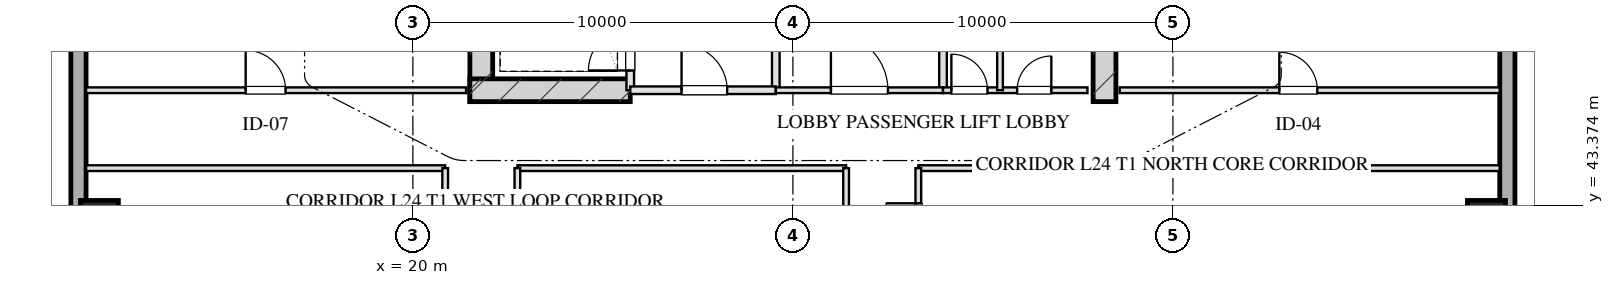
"""IFC4 building model, lengths in metres.
Left out: names, types, materials, properties, quantities, classifications, styles, units other than length and angle.
Written with IfcOpenShell. Run it as: python <this file> out.ifc"""

import sys

from ifc_helpers import new_model, si_unit, direction, frame, frame_2d, origin, origin_2d, place, context, subcontext, project, spatial, rectangle, hollow_rectangle, extrude, element, fill, save


model = new_model("IFC4")
c1 = context("Model", 3, precision=1e-05, world=origin(), true_north=direction((0.0, 1.0)))
c2 = subcontext(c1, "Body", "Model", "MODEL_VIEW")
j1 = project(units=[si_unit("LENGTHUNIT", "METRE"), si_unit("PLANEANGLEUNIT", "RADIAN")], contexts=[c1])
p1 = place(None, origin())
s1 = spatial("IfcSite", under=j1, at=p1, CompositionType="ELEMENT")
p2 = place(p1, origin())
s2 = spatial("IfcBuilding", under=s1, at=p2, CompositionType="ELEMENT")
p3 = place(p2, frame((0.0, 0.0, 96.6)))
s3 = spatial("IfcBuildingStorey", under=s2, at=p3, CompositionType="ELEMENT", Elevation=96.6)
for number, where, z_axis, x_axis in (
    (1, (21.8, 46.1, 0.0), (0.0, 0.0, 1.0), (0.0, 1.0, 0.0)),
    (2, (38.2, 46.1, 0.0), (0.0, 0.0, 1.0), (0.0, 1.0, 0.0)),
):
    element("IfcWall", number, at=place(p3, frame(where, z_axis=z_axis, x_axis=x_axis)), inside=s3, PredefinedType="SHEAR", context=c2, shape_type="SweptSolid", body=[
        extrude(rectangle(XDim=9.48, YDim=0.6, at=frame_2d((4.74, 0.0))), origin(), (0.0, 0.0, 1.0), 3.45),
    ])
p4 = place(p3, frame((21.5, 46.4, 0.0), z_axis=(0.0, 0.0, 1.0), x_axis=(1.0, 0.0, 0.0)))
e3 = element("IfcWall", 3, at=p4, inside=s3, PredefinedType="SHEAR", context=c2, shape_type="SweptSolid", body=[
    extrude(rectangle(XDim=4.22, YDim=0.6, at=frame_2d((2.11, 0.0))), origin(), (0.0, 0.0, 1.0), 3.45),
])
for number, where, z_axis, x_axis in (
    (4, (11.75, 43.0, 0.0), (0.0, 0.0, 1.0), (1.0, 0.0, 0.0)),
    (5, (48.25, 43.0, 0.0), (0.0, 0.0, 1.0), (1.0, 0.0, 0.0)),
):
    element("IfcColumn", number, at=place(p3, frame(where, z_axis=z_axis, x_axis=x_axis)), inside=s3, PredefinedType="COLUMN", context=c2, shape_type="SweptSolid", body=[
        extrude(hollow_rectangle(XDim=1.0, YDim=1.0, WallThickness=0.036, at=origin_2d()), origin(), (0.0, 0.0, 1.0), 3.451),
    ])
p5 = place(p3, frame((11.2, 9.0, 0.0), z_axis=(0.0, 0.0, 1.0), x_axis=(0.0, 1.0, 0.0)))
e6 = element("IfcWall", 6, at=p5, inside=s3, PredefinedType="SOLIDWALL", context=c2, shape_type="SweptSolid", body=[
    extrude(rectangle(XDim=50.0, YDim=0.4, at=frame_2d((25.0, 0.0))), origin(), (0.0, 0.0, 1.0), 2.55),
])
p6 = place(p5, frame((21.2, 0.0, 0.75)))
e7 = element("IfcOpeningElement", 7, at=p6, cuts=e6, PredefinedType="OPENING", context=c2, shape_type="SweptSolid", body=[
    extrude(rectangle(XDim=2.4, YDim=1.4, at=frame_2d((1.2, 0.7))), frame((0.0, 0.21, 0.0), z_axis=(0.0, -1.0, 0.0), x_axis=(1.0, 0.0, 0.0)), (0.0, 0.0, 1.0), 0.42),
])
p7 = place(p5, frame((26.4, 0.0, 0.75)))
e8 = element("IfcOpeningElement", 8, at=p7, cuts=e6, PredefinedType="OPENING", context=c2, shape_type="SweptSolid", body=[
    extrude(rectangle(XDim=2.4, YDim=1.4, at=frame_2d((1.2, 0.7))), frame((0.0, 0.21, 0.0), z_axis=(0.0, -1.0, 0.0), x_axis=(1.0, 0.0, 0.0)), (0.0, 0.0, 1.0), 0.42),
])
p8 = place(p3, frame((48.8, 59.0, 0.0), z_axis=(0.0, 0.0, 1.0), x_axis=(0.0, -1.0, 0.0)))
e9 = element("IfcWall", 9, at=p8, inside=s3, PredefinedType="SOLIDWALL", context=c2, shape_type="SweptSolid", body=[
    extrude(rectangle(XDim=50.0, YDim=0.4, at=frame_2d((25.0, 0.0))), origin(), (0.0, 0.0, 1.0), 2.55),
])
p9 = place(p3, frame((25.72, 46.4, 0.0), z_axis=(0.0, 0.0, 1.0), x_axis=(0.0, 1.0, 0.0)))
e10 = element("IfcWall", 10, at=p9, inside=s3, PredefinedType="PARTITIONING", context=c2, shape_type="SweptSolid", body=[
    extrude(rectangle(XDim=1.9, YDim=0.2, at=frame_2d((0.95, 0.0))), origin(), (0.0, 0.0, 1.0), 3.155),
])
p10 = place(p9, frame((0.52, 0.0, 0.0)))
e11 = element("IfcOpeningElement", 11, at=p10, cuts=e10, PredefinedType="OPENING", context=c2, shape_type="SweptSolid", body=[
    extrude(rectangle(XDim=1.1, YDim=2.05, at=frame_2d((0.55, 1.025))), frame((0.0, 0.11, 0.0), z_axis=(0.0, -1.0, 0.0), x_axis=(1.0, 0.0, 0.0)), (0.0, 0.0, 1.0), 0.22),
])
p11 = place(p3, frame((29.55, 46.4, 0.0), z_axis=(0.0, 0.0, 1.0), x_axis=(0.0, 1.0, 0.0)))
e12 = element("IfcWall", 12, at=p11, inside=s3, PredefinedType="PARTITIONING", context=c2, shape_type="SweptSolid", body=[
    extrude(rectangle(XDim=8.43, YDim=0.2, at=frame_2d((4.215, 0.0))), origin(), (0.0, 0.0, 1.0), 3.155),
])
p12 = place(p3, frame((25.72, 46.4, 0.0), z_axis=(0.0, 0.0, 1.0), x_axis=(1.0, 0.0, 0.0)))
e13 = element("IfcWall", 13, at=p12, inside=s3, PredefinedType="PARTITIONING", context=c2, shape_type="SweptSolid", body=[
    extrude(rectangle(XDim=3.83, YDim=0.2, at=frame_2d((1.915, 0.0))), origin(), (0.0, 0.0, 1.0), 3.155),
])
p13 = place(p12, frame((1.35, 0.0, 0.0)))
e14 = element("IfcOpeningElement", 14, at=p13, cuts=e13, PredefinedType="OPENING", context=c2, shape_type="SweptSolid", body=[
    extrude(rectangle(XDim=1.2, YDim=2.05, at=frame_2d((0.6, 1.025))), frame((0.0, 0.11, 0.0), z_axis=(0.0, -1.0, 0.0), x_axis=(1.0, 0.0, 0.0)), (0.0, 0.0, 1.0), 0.22),
])
p14 = place(p3, frame((33.95, 46.4, 0.0), z_axis=(0.0, 0.0, 1.0), x_axis=(0.0, 1.0, 0.0)))
e15 = element("IfcWall", 15, at=p14, inside=s3, PredefinedType="PARTITIONING", context=c2, shape_type="SweptSolid", body=[
    extrude(rectangle(XDim=8.43, YDim=0.2, at=frame_2d((4.215, 0.0))), origin(), (0.0, 0.0, 1.0), 3.155),
])
p15 = place(p3, frame((29.55, 46.4, 0.0), z_axis=(0.0, 0.0, 1.0), x_axis=(1.0, 0.0, 0.0)))
e16 = element("IfcWall", 16, at=p15, inside=s3, PredefinedType="PARTITIONING", context=c2, shape_type="SweptSolid", body=[
    extrude(rectangle(XDim=4.4, YDim=0.15, at=frame_2d((2.2, 0.0))), origin(), (0.0, 0.0, 1.0), 3.155),
])
p16 = place(p15, frame((1.45, 0.0, 0.0)))
e17 = element("IfcOpeningElement", 17, at=p16, cuts=e16, PredefinedType="OPENING", context=c2, shape_type="SweptSolid", body=[
    extrude(rectangle(XDim=1.5, YDim=2.05, at=frame_2d((0.75, 1.025))), frame((0.0, 0.085, 0.0), z_axis=(0.0, -1.0, 0.0), x_axis=(1.0, 0.0, 0.0)), (0.0, 0.0, 1.0), 0.17),
])
p17 = place(p3, frame((33.95, 46.4, 0.0), z_axis=(0.0, 0.0, 1.0), x_axis=(1.0, 0.0, 0.0)))
e18 = element("IfcWall", 18, at=p17, inside=s3, PredefinedType="PARTITIONING", context=c2, shape_type="SweptSolid", body=[
    extrude(rectangle(XDim=3.8, YDim=0.15, at=frame_2d((1.9, 0.0))), origin(), (0.0, 0.0, 1.0), 3.155),
])
p18 = place(p17, frame((0.22, 0.0, 0.0)))
e19 = element("IfcOpeningElement", 19, at=p18, cuts=e18, PredefinedType="OPENING", context=c2, shape_type="SweptSolid", body=[
    extrude(rectangle(XDim=0.95, YDim=2.05, at=frame_2d((0.475, 1.025))), frame((0.0, 0.085, 0.0), z_axis=(0.0, -1.0, 0.0), x_axis=(1.0, 0.0, 0.0)), (0.0, 0.0, 1.0), 0.17),
])
p19 = place(p17, frame((1.95, 0.0, 0.0)))
e20 = element("IfcOpeningElement", 20, at=p19, cuts=e18, PredefinedType="OPENING", context=c2, shape_type="SweptSolid", body=[
    extrude(rectangle(XDim=0.9, YDim=2.05, at=frame_2d((0.45, 1.025))), frame((0.0, 0.085, 0.0), z_axis=(0.0, -1.0, 0.0), x_axis=(1.0, 0.0, 0.0)), (0.0, 0.0, 1.0), 0.17),
])
p20 = place(p3, frame((35.45, 46.4, 0.0), z_axis=(0.0, 0.0, 1.0), x_axis=(0.0, 1.0, 0.0)))
e21 = element("IfcWall", 21, at=p20, inside=s3, PredefinedType="PARTITIONING", context=c2, shape_type="SweptSolid", body=[
    extrude(rectangle(XDim=8.43, YDim=0.15, at=frame_2d((4.215, 0.0))), origin(), (0.0, 0.0, 1.0), 2.765),
])
p21 = place(p20, frame((2.55, 0.0, 0.0)))
e22 = element("IfcOpeningElement", 22, at=p21, cuts=e21, PredefinedType="OPENING", context=c2, shape_type="SweptSolid", body=[
    extrude(rectangle(XDim=0.95, YDim=2.05, at=frame_2d((0.475, 1.025))), frame((0.0, 0.085, 0.0), z_axis=(0.0, -1.0, 0.0), x_axis=(1.0, 0.0, 0.0)), (0.0, 0.0, 1.0), 0.17),
])
p22 = place(p20, frame((5.6, 0.0, 0.0)))
e23 = element("IfcOpeningElement", 23, at=p22, cuts=e21, PredefinedType="OPENING", context=c2, shape_type="SweptSolid", body=[
    extrude(rectangle(XDim=0.9, YDim=2.05, at=frame_2d((0.45, 1.025))), frame((0.0, 0.085, 0.0), z_axis=(0.0, -1.0, 0.0), x_axis=(1.0, 0.0, 0.0)), (0.0, 0.0, 1.0), 0.17),
])
p23 = place(p3, frame((11.4, 46.4, 0.0), z_axis=(0.0, 0.0, 1.0), x_axis=(1.0, 0.0, 0.0)))
e24 = element("IfcWall", 24, at=p23, inside=s3, PredefinedType="PARTITIONING", context=c2, shape_type="SweptSolid", body=[
    extrude(rectangle(XDim=10.0, YDim=0.15, at=frame_2d((5.0, 0.0))), origin(), (0.0, 0.0, 1.0), 3.155),
])
p24 = place(p23, frame((4.2, 0.0, 0.0)))
e25 = element("IfcOpeningElement", 25, at=p24, cuts=e24, PredefinedType="OPENING", context=c2, shape_type="SweptSolid", body=[
    extrude(rectangle(XDim=1.05, YDim=2.05, at=frame_2d((0.525, 1.025))), frame((0.0, 0.085, 0.0), z_axis=(0.0, -1.0, 0.0), x_axis=(1.0, 0.0, 0.0)), (0.0, 0.0, 1.0), 0.17),
])
p25 = place(p3, frame((38.6, 46.4, 0.0), z_axis=(0.0, 0.0, 1.0), x_axis=(1.0, 0.0, 0.0)))
e26 = element("IfcWall", 26, at=p25, inside=s3, PredefinedType="PARTITIONING", context=c2, shape_type="SweptSolid", body=[
    extrude(rectangle(XDim=10.0, YDim=0.15, at=frame_2d((5.0, 0.0))), origin(), (0.0, 0.0, 1.0), 3.155),
])
p26 = place(p25, frame((4.2, 0.0, 0.0)))
e27 = element("IfcOpeningElement", 27, at=p26, cuts=e26, PredefinedType="OPENING", context=c2, shape_type="SweptSolid", body=[
    extrude(rectangle(XDim=1.0, YDim=2.05, at=frame_2d((0.5, 1.025))), frame((0.0, 0.085, 0.0), z_axis=(0.0, -1.0, 0.0), x_axis=(1.0, 0.0, 0.0)), (0.0, 0.0, 1.0), 0.17),
])
p27 = place(p3, frame((11.4, 44.35, 0.0), z_axis=(0.0, 0.0, 1.0), x_axis=(1.0, 0.0, 0.0)))
e28 = element("IfcWall", 28, at=p27, inside=s3, PredefinedType="PARTITIONING", context=c2, shape_type="SweptSolid", body=[
    extrude(rectangle(XDim=9.45, YDim=0.15, at=frame_2d((4.725, 0.0))), origin(), (0.0, 0.0, 1.0), 3.155),
])
p28 = place(p3, frame((22.75, 44.35, 0.0), z_axis=(0.0, 0.0, 1.0), x_axis=(1.0, 0.0, 0.0)))
e29 = element("IfcWall", 29, at=p28, inside=s3, PredefinedType="PARTITIONING", context=c2, shape_type="SweptSolid", body=[
    extrude(rectangle(XDim=8.65, YDim=0.15, at=frame_2d((4.325, 0.0))), origin(), (0.0, 0.0, 1.0), 3.155),
])
p29 = place(p3, frame((33.3, 44.35, 0.0), z_axis=(0.0, 0.0, 1.0), x_axis=(1.0, 0.0, 0.0)))
e30 = element("IfcWall", 30, at=p29, inside=s3, PredefinedType="PARTITIONING", context=c2, shape_type="SweptSolid", body=[
    extrude(rectangle(XDim=15.3, YDim=0.15, at=frame_2d((7.65, 0.0))), origin(), (0.0, 0.0, 1.0), 3.155),
])
p30 = place(p3, frame((20.85, 23.65, 0.0), z_axis=(0.0, 0.0, 1.0), x_axis=(0.0, 1.0, 0.0)))
e31 = element("IfcWall", 31, at=p30, inside=s3, PredefinedType="PARTITIONING", context=c2, shape_type="SweptSolid", body=[
    extrude(rectangle(XDim=20.7, YDim=0.15, at=frame_2d((10.35, 0.0))), origin(), (0.0, 0.0, 1.0), 3.155),
])
p31 = place(p30, frame((2.175, 0.0, 0.0)))
e32 = element("IfcOpeningElement", 32, at=p31, cuts=e31, PredefinedType="OPENING", context=c2, shape_type="SweptSolid", body=[
    extrude(rectangle(XDim=1.0, YDim=2.05, at=frame_2d((0.5, 1.025))), frame((0.0, 0.085, 0.0), z_axis=(0.0, -1.0, 0.0), x_axis=(1.0, 0.0, 0.0)), (0.0, 0.0, 1.0), 0.17),
])
p32 = place(p30, frame((7.69, 0.0, 0.0)))
e33 = element("IfcOpeningElement", 33, at=p32, cuts=e31, PredefinedType="OPENING", context=c2, shape_type="SweptSolid", body=[
    extrude(rectangle(XDim=1.0, YDim=2.05, at=frame_2d((0.5, 1.025))), frame((0.0, 0.085, 0.0), z_axis=(0.0, -1.0, 0.0), x_axis=(1.0, 0.0, 0.0)), (0.0, 0.0, 1.0), 0.17),
])
p33 = place(p30, frame((12.69, 0.0, 0.0)))
e34 = element("IfcOpeningElement", 34, at=p33, cuts=e31, PredefinedType="OPENING", context=c2, shape_type="SweptSolid", body=[
    extrude(rectangle(XDim=1.0, YDim=2.05, at=frame_2d((0.5, 1.025))), frame((0.0, 0.085, 0.0), z_axis=(0.0, -1.0, 0.0), x_axis=(1.0, 0.0, 0.0)), (0.0, 0.0, 1.0), 0.17),
])
p34 = place(p30, frame((17.525, 0.0, 0.0)))
e35 = element("IfcOpeningElement", 35, at=p34, cuts=e31, PredefinedType="OPENING", context=c2, shape_type="SweptSolid", body=[
    extrude(rectangle(XDim=1.0, YDim=2.05, at=frame_2d((0.5, 1.025))), frame((0.0, 0.085, 0.0), z_axis=(0.0, -1.0, 0.0), x_axis=(1.0, 0.0, 0.0)), (0.0, 0.0, 1.0), 0.17),
])
p35 = place(p3, frame((22.75, 23.65, 0.0), z_axis=(0.0, 0.0, 1.0), x_axis=(0.0, 1.0, 0.0)))
e36 = element("IfcWall", 36, at=p35, inside=s3, PredefinedType="PARTITIONING", context=c2, shape_type="SweptSolid", body=[
    extrude(rectangle(XDim=20.7, YDim=0.15, at=frame_2d((10.35, 0.0))), origin(), (0.0, 0.0, 1.0), 3.155),
])
p36 = place(p35, frame((9.936, 0.0, 0.0)))
e37 = element("IfcOpeningElement", 37, at=p36, cuts=e36, PredefinedType="OPENING", context=c2, shape_type="SweptSolid", body=[
    extrude(rectangle(XDim=1.1, YDim=2.05, at=frame_2d((0.55, 1.025))), frame((0.0, 0.085, 0.0), z_axis=(0.0, -1.0, 0.0), x_axis=(1.0, 0.0, 0.0)), (0.0, 0.0, 1.0), 0.17),
])
p37 = place(p3, frame((31.4, 23.65, 0.0), z_axis=(0.0, 0.0, 1.0), x_axis=(0.0, 1.0, 0.0)))
e38 = element("IfcWall", 38, at=p37, inside=s3, PredefinedType="PARTITIONING", context=c2, shape_type="SweptSolid", body=[
    extrude(rectangle(XDim=20.7, YDim=0.15, at=frame_2d((10.35, 0.0))), origin(), (0.0, 0.0, 1.0), 3.155),
])
p38 = place(p3, frame((33.3, 23.65, 0.0), z_axis=(0.0, 0.0, 1.0), x_axis=(0.0, 1.0, 0.0)))
e39 = element("IfcWall", 39, at=p38, inside=s3, PredefinedType="PARTITIONING", context=c2, shape_type="SweptSolid", body=[
    extrude(rectangle(XDim=20.7, YDim=0.15, at=frame_2d((10.35, 0.0))), origin(), (0.0, 0.0, 1.0), 3.155),
])
p39 = place(p38, frame((2.175, 0.0, 0.0)))
e40 = element("IfcOpeningElement", 40, at=p39, cuts=e39, PredefinedType="OPENING", context=c2, shape_type="SweptSolid", body=[
    extrude(rectangle(XDim=1.05, YDim=2.05, at=frame_2d((0.525, 1.025))), frame((0.0, 0.085, 0.0), z_axis=(0.0, -1.0, 0.0), x_axis=(1.0, 0.0, 0.0)), (0.0, 0.0, 1.0), 0.17),
])
p40 = place(p38, frame((6.75, 0.0, 0.0)))
e41 = element("IfcOpeningElement", 41, at=p40, cuts=e39, PredefinedType="OPENING", context=c2, shape_type="SweptSolid", body=[
    extrude(rectangle(XDim=1.0, YDim=2.05, at=frame_2d((0.5, 1.025))), frame((0.0, 0.085, 0.0), z_axis=(0.0, -1.0, 0.0), x_axis=(1.0, 0.0, 0.0)), (0.0, 0.0, 1.0), 0.17),
])
p41 = place(p38, frame((11.25, 0.0, 0.0)))
e42 = element("IfcOpeningElement", 42, at=p41, cuts=e39, PredefinedType="OPENING", context=c2, shape_type="SweptSolid", body=[
    extrude(rectangle(XDim=1.0, YDim=2.05, at=frame_2d((0.5, 1.025))), frame((0.0, 0.085, 0.0), z_axis=(0.0, -1.0, 0.0), x_axis=(1.0, 0.0, 0.0)), (0.0, 0.0, 1.0), 0.17),
])
p42 = place(p38, frame((15.75, 0.0, 0.0)))
e43 = element("IfcOpeningElement", 43, at=p42, cuts=e39, PredefinedType="OPENING", context=c2, shape_type="SweptSolid", body=[
    extrude(rectangle(XDim=1.0, YDim=2.05, at=frame_2d((0.5, 1.025))), frame((0.0, 0.085, 0.0), z_axis=(0.0, -1.0, 0.0), x_axis=(1.0, 0.0, 0.0)), (0.0, 0.0, 1.0), 0.17),
])
p43 = place(p38, frame((18.925, 0.0, 0.0)))
e44 = element("IfcOpeningElement", 44, at=p43, cuts=e39, PredefinedType="OPENING", context=c2, shape_type="SweptSolid", body=[
    extrude(rectangle(XDim=0.85, YDim=2.05, at=frame_2d((0.425, 1.025))), frame((0.0, 0.085, 0.0), z_axis=(0.0, -1.0, 0.0), x_axis=(1.0, 0.0, 0.0)), (0.0, 0.0, 1.0), 0.17),
])
p44 = place(p10, origin())
e45 = element("IfcDoor", 45, at=p44, inside=s3, OperationType="SINGLE_SWING_LEFT", PredefinedType="DOOR", context=c2, shape_type="SweptSolid", body=[
    extrude(rectangle(XDim=1.1, YDim=2.05, at=frame_2d((0.55, 1.025))), frame((0.0, 0.025, 0.0), z_axis=(0.0, -1.0, 0.0), x_axis=(1.0, 0.0, 0.0)), (0.0, 0.0, 1.0), 0.05),
])
fill(e11, e45)
p45 = place(p13, origin())
e46 = element("IfcDoor", 46, at=p45, inside=s3, OperationType="SINGLE_SWING_LEFT", PredefinedType="DOOR", context=c2, shape_type="SweptSolid", body=[
    extrude(rectangle(XDim=1.2, YDim=2.05, at=frame_2d((0.6, 1.025))), frame((0.0, 0.025, 0.0), z_axis=(0.0, -1.0, 0.0), x_axis=(1.0, 0.0, 0.0)), (0.0, 0.0, 1.0), 0.05),
])
fill(e14, e46)
p46 = place(p16, origin())
e47 = element("IfcDoor", 47, at=p46, inside=s3, OperationType="SINGLE_SWING_LEFT", PredefinedType="DOOR", context=c2, shape_type="SweptSolid", body=[
    extrude(rectangle(XDim=1.5, YDim=2.05, at=frame_2d((0.75, 1.025))), frame((0.0, 0.025, 0.0), z_axis=(0.0, -1.0, 0.0), x_axis=(1.0, 0.0, 0.0)), (0.0, 0.0, 1.0), 0.05),
])
fill(e17, e47)
p47 = place(p18, origin())
e48 = element("IfcDoor", 48, at=p47, inside=s3, OperationType="SINGLE_SWING_LEFT", PredefinedType="DOOR", context=c2, shape_type="SweptSolid", body=[
    extrude(rectangle(XDim=0.95, YDim=2.05, at=frame_2d((0.475, 1.025))), frame((0.0, 0.025, 0.0), z_axis=(0.0, -1.0, 0.0), x_axis=(1.0, 0.0, 0.0)), (0.0, 0.0, 1.0), 0.05),
])
fill(e19, e48)
p48 = place(p19, origin())
e49 = element("IfcDoor", 49, at=p48, inside=s3, OperationType="SINGLE_SWING_RIGHT", PredefinedType="DOOR", context=c2, shape_type="SweptSolid", body=[
    extrude(rectangle(XDim=0.9, YDim=2.05, at=frame_2d((0.45, 1.025))), frame((0.0, 0.025, 0.0), z_axis=(0.0, -1.0, 0.0), x_axis=(1.0, 0.0, 0.0)), (0.0, 0.0, 1.0), 0.05),
])
fill(e20, e49)
p49 = place(p24, origin())
e50 = element("IfcDoor", 50, at=p49, inside=s3, OperationType="SINGLE_SWING_LEFT", PredefinedType="DOOR", context=c2, shape_type="SweptSolid", body=[
    extrude(rectangle(XDim=1.05, YDim=2.05, at=frame_2d((0.525, 1.025))), frame((0.0, 0.025, 0.0), z_axis=(0.0, -1.0, 0.0), x_axis=(1.0, 0.0, 0.0)), (0.0, 0.0, 1.0), 0.05),
])
fill(e25, e50)
p50 = place(p26, origin())
e51 = element("IfcDoor", 51, at=p50, inside=s3, OperationType="SINGLE_SWING_LEFT", PredefinedType="DOOR", context=c2, shape_type="SweptSolid", body=[
    extrude(rectangle(XDim=1.0, YDim=2.05, at=frame_2d((0.5, 1.025))), frame((0.0, 0.025, 0.0), z_axis=(0.0, -1.0, 0.0), x_axis=(1.0, 0.0, 0.0)), (0.0, 0.0, 1.0), 0.05),
])
fill(e27, e51)
p51 = place(p43, origin())
e52 = element("IfcDoor", 52, at=p51, inside=s3, OperationType="SINGLE_SWING_RIGHT", PredefinedType="DOOR", context=c2, shape_type="SweptSolid", body=[
    extrude(rectangle(XDim=0.85, YDim=2.05, at=frame_2d((0.425, 1.025))), frame((0.0, 0.025, 0.0), z_axis=(0.0, -1.0, 0.0), x_axis=(1.0, 0.0, 0.0)), (0.0, 0.0, 1.0), 0.05),
])
fill(e44, e52)
save(model, sys.argv[1])
